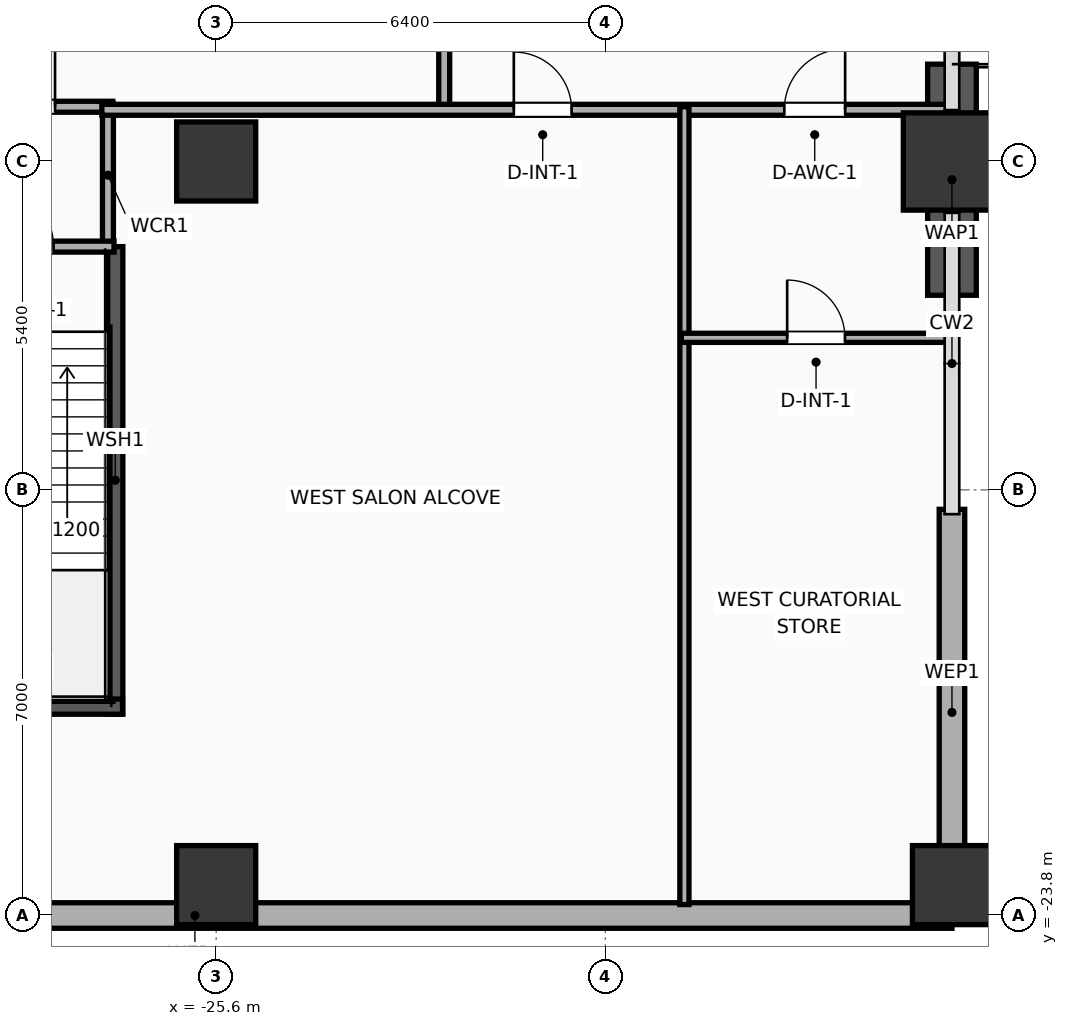
"""IFC4 building model, lengths in metres.
Left out: names, types, materials, properties, quantities, classifications, styles, units other than length and angle.
Written with IfcOpenShell. Run it as: python <this file> out.ifc"""

import sys

from ifc_helpers import new_model, si_unit, direction, frame, frame_2d, origin, origin_2d, place, context, subcontext, project, spatial, rectangle, extrude, element, fill, save


model = new_model("IFC4")
c1 = context("Model", 3, precision=1e-05, world=origin(), true_north=direction((0.0, 1.0)))
c2 = subcontext(c1, "Body", "Model", "MODEL_VIEW")
j1 = project(units=[si_unit("LENGTHUNIT", "METRE"), si_unit("PLANEANGLEUNIT", "RADIAN")], contexts=[c1])
p1 = place(None, origin())
s1 = spatial("IfcSite", under=j1, at=p1, CompositionType="ELEMENT")
p2 = place(p1, origin())
s2 = spatial("IfcBuilding", under=s1, at=p2, CompositionType="ELEMENT")
p3 = place(p2, frame((0.0, 0.0, 5.2)))
s3 = spatial("IfcBuildingStorey", under=s2, at=p3, CompositionType="ELEMENT", Elevation=5.2)
p4 = place(p3, frame((-27.26, -20.485, 0.0), z_axis=(0.0, 0.0, 1.0), x_axis=(0.0, 1.0, 0.0)))
e1 = element("IfcWall", 1, at=p4, inside=s3, PredefinedType="SOLIDWALL", context=c2, shape_type="SweptSolid", body=[
    extrude(rectangle(XDim=7.685, YDim=0.25, at=frame_2d((3.843, 0.0))), origin(), (0.0, 0.0, 1.0), 4.92),
])
p5 = place(p3, frame((-30.46, -20.365, 0.0), z_axis=(0.0, 0.0, 1.0), x_axis=(1.0, 0.0, 0.0)))
e2 = element("IfcWall", 2, at=p5, inside=s3, PredefinedType="SOLIDWALL", context=c2, shape_type="SweptSolid", body=[
    extrude(rectangle(XDim=3.32, YDim=0.25, at=frame_2d((1.66, 0.0))), origin(), (0.0, 0.0, 1.0), 4.92),
])
for number, where, z_axis, x_axis in (
    (3, (-25.6, -23.3, 0.0), (0.0, 0.0, 1.0), (1.0, 0.0, 0.0)),
    (4, (-25.6, -11.4, 0.0), (0.0, 0.0, 1.0), (1.0, 0.0, 0.0)),
    (5, (-13.5, -23.3, 0.0), (0.0, 0.0, 1.0), (1.0, 0.0, 0.0)),
):
    element("IfcColumn", number, at=place(p3, frame(where, z_axis=z_axis, x_axis=x_axis)), inside=s3, PredefinedType="COLUMN", context=c2, shape_type="SweptSolid", body=[
        extrude(rectangle(XDim=1.3, YDim=1.3, at=origin_2d()), origin(), (0.0, 0.0, 1.0), 5.2),
    ])
p6 = place(p3, frame((-13.5, -11.4, 0.0), z_axis=(0.0, 0.0, 1.0), x_axis=(1.0, 0.0, 0.0)))
e6 = element("IfcColumn", 6, at=p6, inside=s3, PredefinedType="COLUMN", context=c2, shape_type="SweptSolid", body=[
    extrude(rectangle(XDim=1.6, YDim=1.6, at=origin_2d()), origin(), (0.0, 0.0, 1.0), 5.2),
])
p7 = place(p3, frame((-13.5, -13.6, 0.0), z_axis=(0.0, 0.0, 1.0), x_axis=(0.0, 1.0, 0.0)))
e7 = element("IfcWall", 7, at=p7, inside=s3, PredefinedType="SOLIDWALL", context=c2, shape_type="SweptSolid", body=[
    extrude(rectangle(XDim=3.8, YDim=0.8, at=frame_2d((1.9, 0.0))), origin(), (0.0, 0.0, 1.0), 4.92),
])
p8 = place(p3, frame((-38.4, -23.8, 0.0), z_axis=(0.0, 0.0, 1.0), x_axis=(1.0, 0.0, 0.0)))
e8 = element("IfcWall", 8, at=p8, inside=s3, PredefinedType="ELEMENTEDWALL", context=c2, shape_type="SweptSolid", body=[
    extrude(rectangle(XDim=24.9, YDim=0.42, at=frame_2d((12.45, 0.0))), origin(), (0.0, 0.0, 1.0), 4.92),
])
p9 = place(p8, frame((2.75, 0.0, 0.65)))
e9 = element("IfcOpeningElement", 9, at=p9, cuts=e8, PredefinedType="OPENING", context=c2, shape_type="SweptSolid", body=[
    extrude(rectangle(XDim=2.8, YDim=2.6, at=frame_2d((1.4, 1.3))), frame((0.0, 0.22, 0.0), z_axis=(0.0, -1.0, 0.0), x_axis=(1.0, 0.0, 0.0)), (0.0, 0.0, 1.0), 0.44),
])
p10 = place(p3, frame((-13.5, -23.8, 0.0), z_axis=(0.0, 0.0, 1.0), x_axis=(0.0, 1.0, 0.0)))
e10 = element("IfcWall", 10, at=p10, inside=s3, PredefinedType="ELEMENTEDWALL", context=c2, shape_type="SweptSolid", body=[
    extrude(rectangle(XDim=6.68, YDim=0.42, at=frame_2d((3.34, 0.0))), origin(), (0.0, 0.0, 1.0), 4.21),
])
p11 = place(p3, frame((-27.38, -12.8, 0.0), z_axis=(0.0, 0.0, 1.0), x_axis=(0.0, 1.0, 0.0)))
e11 = element("IfcWall", 11, at=p11, inside=s3, PredefinedType="PARTITIONING", context=c2, shape_type="SweptSolid", body=[
    extrude(rectangle(XDim=2.35, YDim=0.18, at=frame_2d((1.175, 0.0))), origin(), (0.0, 0.0, 1.0), 4.92),
])
p12 = place(p3, frame((-30.32, -12.8, 0.0), z_axis=(0.0, 0.0, 1.0), x_axis=(1.0, 0.0, 0.0)))
e12 = element("IfcWall", 12, at=p12, inside=s3, PredefinedType="PARTITIONING", context=c2, shape_type="SweptSolid", body=[
    extrude(rectangle(XDim=3.04, YDim=0.18, at=frame_2d((1.52, 0.0))), origin(), (0.0, 0.0, 1.0), 4.92),
])
p13 = place(p12, frame((0.995, 0.0, 0.0)))
e13 = element("IfcOpeningElement", 13, at=p13, cuts=e12, PredefinedType="OPENING", context=c2, shape_type="SweptSolid", body=[
    extrude(rectangle(XDim=1.05, YDim=2.05, at=frame_2d((0.525, 1.025))), frame((0.0, 0.1, 0.0), z_axis=(0.0, -1.0, 0.0), x_axis=(1.0, 0.0, 0.0)), (0.0, 0.0, 1.0), 0.2),
])
p14 = place(p3, frame((-30.32, -10.5, 0.0), z_axis=(0.0, 0.0, 1.0), x_axis=(1.0, 0.0, 0.0)))
e14 = element("IfcWall", 14, at=p14, inside=s3, PredefinedType="PARTITIONING", context=c2, shape_type="SweptSolid", body=[
    extrude(rectangle(XDim=3.02, YDim=0.18, at=frame_2d((1.51, 0.0))), origin(), (0.0, 0.0, 1.0), 4.92),
])
p15 = place(p14, frame((0.97, 0.0, 0.0)))
e15 = element("IfcOpeningElement", 15, at=p15, cuts=e14, PredefinedType="OPENING", context=c2, shape_type="SweptSolid", body=[
    extrude(rectangle(XDim=1.1, YDim=2.05, at=frame_2d((0.55, 1.025))), frame((0.0, 0.1, 0.0), z_axis=(0.0, -1.0, 0.0), x_axis=(1.0, 0.0, 0.0)), (0.0, 0.0, 1.0), 0.2),
])
p16 = place(p3, frame((-21.85, -10.5, 0.0), z_axis=(0.0, 0.0, 1.0), x_axis=(0.0, 1.0, 0.0)))
e16 = element("IfcWall", 16, at=p16, inside=s3, PredefinedType="PARTITIONING", context=c2, shape_type="SweptSolid", body=[
    extrude(rectangle(XDim=34.12, YDim=0.18, at=frame_2d((17.06, 0.0))), origin(), (0.0, 0.0, 1.0), 4.92),
])
p17 = place(p16, frame((13.531, 0.0, 0.0)))
e17 = element("IfcOpeningElement", 17, at=p17, cuts=e16, PredefinedType="OPENING", context=c2, shape_type="SweptSolid", body=[
    extrude(rectangle(XDim=1.6, YDim=2.05, at=frame_2d((0.8, 1.025))), frame((0.0, 0.1, 0.0), z_axis=(0.0, -1.0, 0.0), x_axis=(1.0, 0.0, 0.0)), (0.0, 0.0, 1.0), 0.2),
])
p18 = place(p3, frame((-27.48, -10.55, 0.0), z_axis=(0.0, 0.0, 1.0), x_axis=(1.0, 0.0, 0.0)))
e18 = element("IfcWall", 18, at=p18, inside=s3, PredefinedType="PARTITIONING", context=c2, shape_type="SweptSolid", body=[
    extrude(rectangle(XDim=13.96, YDim=0.18, at=frame_2d((6.98, 0.0))), origin(), (0.0, 0.0, 1.0), 4.92),
])
p19 = place(p18, frame((6.775, 0.0, 0.0)))
e19 = element("IfcOpeningElement", 19, at=p19, cuts=e18, PredefinedType="OPENING", context=c2, shape_type="SweptSolid", body=[
    extrude(rectangle(XDim=0.95, YDim=2.05, at=frame_2d((0.475, 1.025))), frame((0.0, 0.1, 0.0), z_axis=(0.0, -1.0, 0.0), x_axis=(1.0, 0.0, 0.0)), (0.0, 0.0, 1.0), 0.2),
])
p20 = place(p18, frame((11.223, 0.0, 0.0)))
e20 = element("IfcOpeningElement", 20, at=p20, cuts=e18, PredefinedType="OPENING", context=c2, shape_type="SweptSolid", body=[
    extrude(rectangle(XDim=1.0, YDim=2.05, at=frame_2d((0.5, 1.025))), frame((0.0, 0.1, 0.0), z_axis=(0.0, -1.0, 0.0), x_axis=(1.0, 0.0, 0.0)), (0.0, 0.0, 1.0), 0.2),
])
p21 = place(p3, frame((-17.9, -23.62, 0.0), z_axis=(0.0, 0.0, 1.0), x_axis=(0.0, 1.0, 0.0)))
e21 = element("IfcWall", 21, at=p21, inside=s3, PredefinedType="PLUMBINGWALL", context=c2, shape_type="SweptSolid", body=[
    extrude(rectangle(XDim=13.12, YDim=0.15, at=frame_2d((6.56, 0.0))), origin(), (0.0, 0.0, 1.0), 4.92),
])
p22 = place(p3, frame((-17.95, -14.3, 0.0), z_axis=(0.0, 0.0, 1.0), x_axis=(1.0, 0.0, 0.0)))
e22 = element("IfcWall", 22, at=p22, inside=s3, PredefinedType="PLUMBINGWALL", context=c2, shape_type="SweptSolid", body=[
    extrude(rectangle(XDim=4.43, YDim=0.15, at=frame_2d((2.215, 0.0))), origin(), (0.0, 0.0, 1.0), 4.92),
])
p23 = place(p22, frame((1.74, 0.0, 0.0)))
e23 = element("IfcOpeningElement", 23, at=p23, cuts=e22, PredefinedType="OPENING", context=c2, shape_type="SweptSolid", body=[
    extrude(rectangle(XDim=0.95, YDim=2.05, at=frame_2d((0.475, 1.025))), frame((0.0, 0.085, 0.0), z_axis=(0.0, -1.0, 0.0), x_axis=(1.0, 0.0, 0.0)), (0.0, 0.0, 1.0), 0.17),
])
p24 = place(p13, origin())
e24 = element("IfcDoor", 24, at=p24, inside=s3, OperationType="SINGLE_SWING_LEFT", PredefinedType="DOOR", context=c2, shape_type="SweptSolid", body=[
    extrude(rectangle(XDim=1.05, YDim=2.05, at=frame_2d((0.525, 1.025))), frame((0.0, 0.025, 0.0), z_axis=(0.0, -1.0, 0.0), x_axis=(1.0, 0.0, 0.0)), (0.0, 0.0, 1.0), 0.05),
])
fill(e13, e24)
p25 = place(p15, origin())
e25 = element("IfcDoor", 25, at=p25, inside=s3, OperationType="SINGLE_SWING_RIGHT", PredefinedType="DOOR", context=c2, shape_type="SweptSolid", body=[
    extrude(rectangle(XDim=1.1, YDim=2.05, at=frame_2d((0.55, 1.025))), frame((0.0, 0.025, 0.0), z_axis=(0.0, -1.0, 0.0), x_axis=(1.0, 0.0, 0.0)), (0.0, 0.0, 1.0), 0.05),
])
fill(e15, e25)
p26 = place(p19, origin())
e26 = element("IfcDoor", 26, at=p26, inside=s3, OperationType="SINGLE_SWING_LEFT", PredefinedType="DOOR", context=c2, shape_type="SweptSolid", body=[
    extrude(rectangle(XDim=0.95, YDim=2.05, at=frame_2d((0.475, 1.025))), frame((0.0, 0.025, 0.0), z_axis=(0.0, -1.0, 0.0), x_axis=(1.0, 0.0, 0.0)), (0.0, 0.0, 1.0), 0.05),
])
fill(e19, e26)
p27 = place(p20, origin())
e27 = element("IfcDoor", 27, at=p27, inside=s3, OperationType="SINGLE_SWING_RIGHT", PredefinedType="DOOR", context=c2, shape_type="SweptSolid", body=[
    extrude(rectangle(XDim=1.0, YDim=2.05, at=frame_2d((0.5, 1.025))), frame((0.0, 0.025, 0.0), z_axis=(0.0, -1.0, 0.0), x_axis=(1.0, 0.0, 0.0)), (0.0, 0.0, 1.0), 0.05),
])
fill(e20, e27)
p28 = place(p23, origin())
e28 = element("IfcDoor", 28, at=p28, inside=s3, OperationType="SINGLE_SWING_LEFT", PredefinedType="DOOR", context=c2, shape_type="SweptSolid", body=[
    extrude(rectangle(XDim=0.95, YDim=2.05, at=frame_2d((0.475, 1.025))), frame((0.0, 0.025, 0.0), z_axis=(0.0, -1.0, 0.0), x_axis=(1.0, 0.0, 0.0)), (0.0, 0.0, 1.0), 0.05),
])
fill(e23, e28)
save(model, sys.argv[1])
